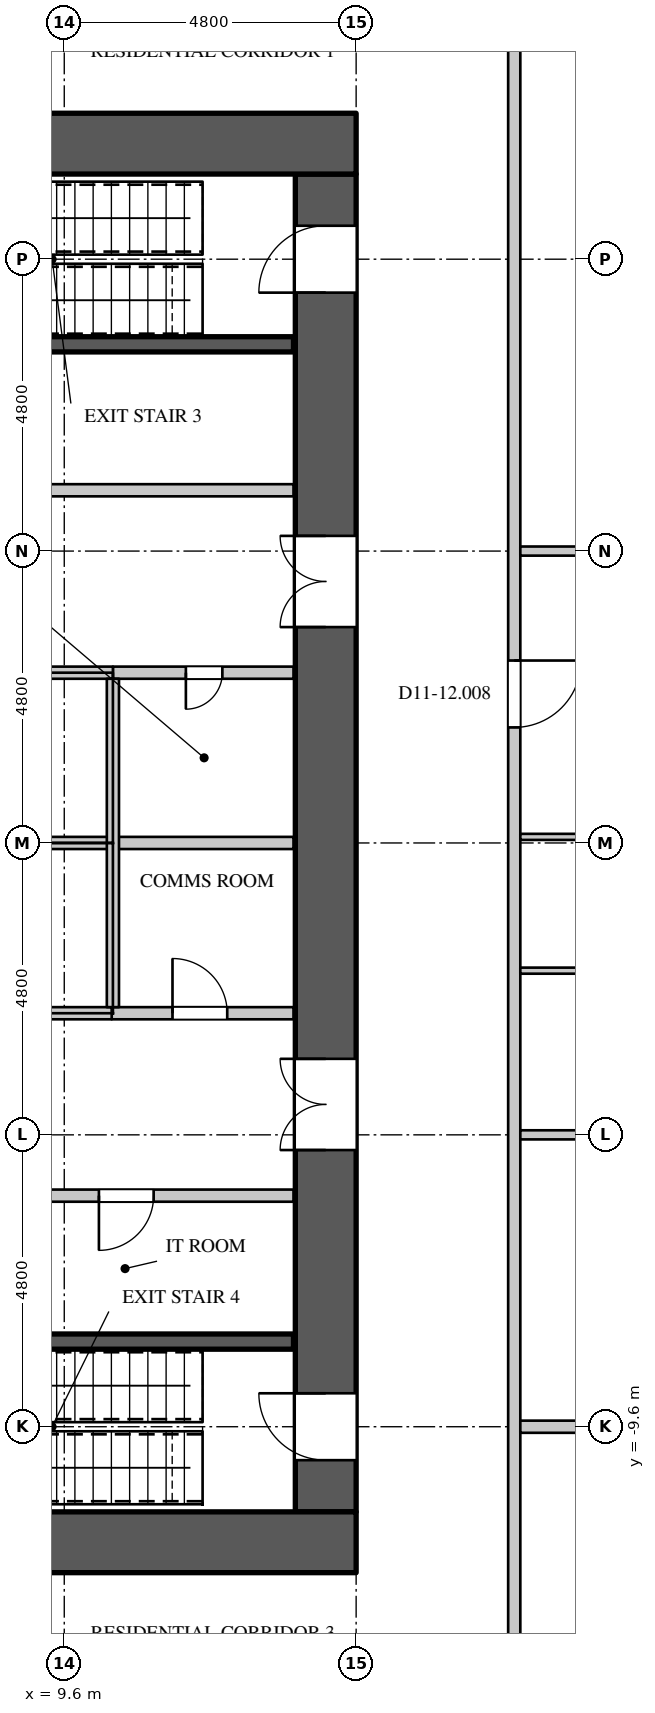
"""IFC4 building model, lengths in metres.
Left out: names, types, materials, properties, quantities, classifications, styles, units other than length and angle.
Written with IfcOpenShell. Run it as: python <this file> out.ifc"""

import sys

from ifc_helpers import new_model, si_unit, direction, frame, frame_2d, origin, place, context, subcontext, project, spatial, rectangle, extrude, element, fill, save


model = new_model("IFC4")
c1 = context("Model", 3, precision=1e-05, world=origin(), true_north=direction((0.0, 1.0)))
c2 = subcontext(c1, "Body", "Model", "MODEL_VIEW")
j1 = project(units=[si_unit("LENGTHUNIT", "METRE"), si_unit("PLANEANGLEUNIT", "RADIAN")], contexts=[c1])
p1 = place(None, origin())
s1 = spatial("IfcSite", under=j1, at=p1, CompositionType="ELEMENT")
p2 = place(p1, origin())
s2 = spatial("IfcBuilding", under=s1, at=p2, CompositionType="ELEMENT")
p3 = place(p2, frame((0.0, 0.0, 50.7)))
s3 = spatial("IfcBuildingStorey", under=s2, at=p3, CompositionType="ELEMENT", Elevation=50.7)
for number, where, z_axis, x_axis in (
    (1, (-14.4, 11.5, 0.0), (0.0, 0.0, 1.0), (1.0, 0.0, 0.0)),
    (2, (-14.4, -11.5, 0.0), (0.0, 0.0, 1.0), (1.0, 0.0, 0.0)),
):
    element("IfcWall", number, at=place(p3, frame(where, z_axis=z_axis, x_axis=x_axis)), inside=s3, PredefinedType="SHEAR", context=c2, shape_type="SweptSolid", body=[
        extrude(rectangle(XDim=28.8, YDim=1.0, at=frame_2d((14.4, 0.0))), origin(), (0.0, 0.0, 1.0), 4.2),
    ])
p4 = place(p3, frame((13.9, -11.0, 0.0), z_axis=(0.0, 0.0, 1.0), x_axis=(0.0, 1.0, 0.0)))
e3 = element("IfcWall", 3, at=p4, inside=s3, PredefinedType="SHEAR", context=c2, shape_type="SweptSolid", body=[
    extrude(rectangle(XDim=22.0, YDim=1.0, at=frame_2d((11.0, 0.0))), origin(), (0.0, 0.0, 1.0), 4.2),
])
p5 = place(p4, frame((20.05, 0.0, 0.0)))
e4 = element("IfcOpeningElement", 4, at=p5, cuts=e3, PredefinedType="OPENING", context=c2, shape_type="SweptSolid", body=[
    extrude(rectangle(XDim=1.1, YDim=2.2, at=frame_2d((0.55, 1.1))), frame((0.0, 0.51, 0.0), z_axis=(0.0, -1.0, 0.0), x_axis=(1.0, 0.0, 0.0)), (0.0, 0.0, 1.0), 1.02),
])
p6 = place(p4, frame((0.85, 0.0, 0.0)))
e5 = element("IfcOpeningElement", 5, at=p6, cuts=e3, PredefinedType="OPENING", context=c2, shape_type="SweptSolid", body=[
    extrude(rectangle(XDim=1.1, YDim=2.2, at=frame_2d((0.55, 1.1))), frame((0.0, 0.51, 0.0), z_axis=(0.0, -1.0, 0.0), x_axis=(1.0, 0.0, 0.0)), (0.0, 0.0, 1.0), 1.02),
])
p7 = place(p4, frame((14.55, 0.0, 0.0)))
e6 = element("IfcOpeningElement", 6, at=p7, cuts=e3, PredefinedType="OPENING", context=c2, shape_type="SweptSolid", body=[
    extrude(rectangle(XDim=1.5, YDim=2.4, at=frame_2d((0.75, 1.2))), frame((0.0, 0.51, 0.0), z_axis=(0.0, -1.0, 0.0), x_axis=(1.0, 0.0, 0.0)), (0.0, 0.0, 1.0), 1.02),
])
p8 = place(p4, frame((5.95, 0.0, 0.0)))
e7 = element("IfcOpeningElement", 7, at=p8, cuts=e3, PredefinedType="OPENING", context=c2, shape_type="SweptSolid", body=[
    extrude(rectangle(XDim=1.5, YDim=2.4, at=frame_2d((0.75, 1.2))), frame((0.0, 0.51, 0.0), z_axis=(0.0, -1.0, 0.0), x_axis=(1.0, 0.0, 0.0)), (0.0, 0.0, 1.0), 1.02),
])
p9 = place(p3, frame((17.0, -14.5, 0.0), z_axis=(0.0, 0.0, 1.0), x_axis=(0.0, 1.0, 0.0)))
e8 = element("IfcWall", 8, at=p9, inside=s3, PredefinedType="PARTITIONING", context=c2, shape_type="SweptSolid", body=[
    extrude(rectangle(XDim=29.0, YDim=0.2, at=frame_2d((14.5, 0.0))), origin(), (0.0, 0.0, 1.0), 3.95),
])
p10 = place(p9, frame((16.4, 0.0, 0.0)))
e9 = element("IfcOpeningElement", 9, at=p10, cuts=e8, PredefinedType="OPENING", context=c2, shape_type="SweptSolid", body=[
    extrude(rectangle(XDim=1.1, YDim=2.4, at=frame_2d((0.55, 1.2))), frame((0.0, 0.11, 0.0), z_axis=(0.0, -1.0, 0.0), x_axis=(1.0, 0.0, 0.0)), (0.0, 0.0, 1.0), 0.22),
])
p11 = place(p3, frame((17.1, -4.8, 0.0), z_axis=(0.0, 0.0, 1.0), x_axis=(1.0, 0.0, 0.0)))
e10 = element("IfcWall", 10, at=p11, inside=s3, PredefinedType="PARTITIONING", context=c2, shape_type="SweptSolid", body=[
    extrude(rectangle(XDim=10.8, YDim=0.15, at=frame_2d((5.4, 0.0))), origin(), (0.0, 0.0, 1.0), 3.25),
])
p12 = place(p11, frame((1.8, 0.0, 0.0)))
e11 = element("IfcOpeningElement", 11, at=p12, cuts=e10, PredefinedType="OPENING", context=c2, shape_type="SweptSolid", body=[
    extrude(rectangle(XDim=0.95, YDim=2.2, at=frame_2d((0.475, 1.1))), frame((0.0, 0.085, 0.0), z_axis=(0.0, -1.0, 0.0), x_axis=(1.0, 0.0, 0.0)), (0.0, 0.0, 1.0), 0.17),
])
p13 = place(p3, frame((17.1, 4.8, 0.0), z_axis=(0.0, 0.0, 1.0), x_axis=(1.0, 0.0, 0.0)))
e12 = element("IfcWall", 12, at=p13, inside=s3, PredefinedType="PARTITIONING", context=c2, shape_type="SweptSolid", body=[
    extrude(rectangle(XDim=10.8, YDim=0.15, at=frame_2d((5.4, 0.0))), origin(), (0.0, 0.0, 1.0), 3.25),
])
p14 = place(p13, frame((1.8, 0.0, 0.0)))
e13 = element("IfcOpeningElement", 13, at=p14, cuts=e12, PredefinedType="OPENING", context=c2, shape_type="SweptSolid", body=[
    extrude(rectangle(XDim=0.95, YDim=2.2, at=frame_2d((0.475, 1.1))), frame((0.0, 0.085, 0.0), z_axis=(0.0, -1.0, 0.0), x_axis=(1.0, 0.0, 0.0)), (0.0, 0.0, 1.0), 0.17),
])
p15 = place(p3, frame((17.552, -17.446, 0.0), z_axis=(0.0, 0.0, 1.0), x_axis=(0.707106781187, 0.707106781187, 0.0)))
e14 = element("IfcWall", 14, at=p15, inside=s3, PredefinedType="PARTITIONING", context=c2, shape_type="SweptSolid", body=[
    extrude(rectangle(XDim=7.78, YDim=0.15, at=frame_2d((3.89, 0.0))), origin(), (0.0, 0.0, 1.0), 3.95),
])
p16 = place(p15, frame((1.95, 0.0, 0.0)))
e15 = element("IfcOpeningElement", 15, at=p16, cuts=e14, PredefinedType="OPENING", context=c2, shape_type="SweptSolid", body=[
    extrude(rectangle(XDim=0.95, YDim=2.2, at=frame_2d((0.475, 1.1))), frame((0.0, 0.085, 0.0), z_axis=(0.0, -1.0, 0.0), x_axis=(1.0, 0.0, 0.0)), (0.0, 0.0, 1.0), 0.17),
])
p17 = place(p15, frame((6.65, 0.0, 0.0)))
e16 = element("IfcOpeningElement", 16, at=p17, cuts=e14, PredefinedType="OPENING", context=c2, shape_type="SweptSolid", body=[
    extrude(rectangle(XDim=0.95, YDim=2.2, at=frame_2d((0.475, 1.1))), frame((0.0, 0.085, 0.0), z_axis=(0.0, -1.0, 0.0), x_axis=(1.0, 0.0, 0.0)), (0.0, 0.0, 1.0), 0.17),
])
p18 = place(p3, frame((17.693, 17.587, 0.0), z_axis=(0.0, 0.0, 1.0), x_axis=(0.707106781187, -0.707106781187, 0.0)))
e17 = element("IfcWall", 17, at=p18, inside=s3, PredefinedType="PARTITIONING", context=c2, shape_type="SweptSolid", body=[
    extrude(rectangle(XDim=7.863, YDim=0.15, at=frame_2d((3.931, 0.0))), origin(), (0.0, 0.0, 1.0), 3.95),
])
p19 = place(p18, frame((2.05, 0.0, 0.0)))
e18 = element("IfcOpeningElement", 18, at=p19, cuts=e17, PredefinedType="OPENING", context=c2, shape_type="SweptSolid", body=[
    extrude(rectangle(XDim=0.95, YDim=2.2, at=frame_2d((0.475, 1.1))), frame((0.0, 0.085, 0.0), z_axis=(0.0, -1.0, 0.0), x_axis=(1.0, 0.0, 0.0)), (0.0, 0.0, 1.0), 0.17),
])
p20 = place(p18, frame((6.7, 0.0, 0.0)))
e19 = element("IfcOpeningElement", 19, at=p20, cuts=e17, PredefinedType="OPENING", context=c2, shape_type="SweptSolid", body=[
    extrude(rectangle(XDim=0.95, YDim=2.2, at=frame_2d((0.475, 1.1))), frame((0.0, 0.085, 0.0), z_axis=(0.0, -1.0, 0.0), x_axis=(1.0, 0.0, 0.0)), (0.0, 0.0, 1.0), 0.17),
])
p21 = place(p3, frame((17.1, -9.6, 0.0), z_axis=(0.0, 0.0, 1.0), x_axis=(1.0, 0.0, 0.0)))
e20 = element("IfcWall", 20, at=p21, inside=s3, PredefinedType="PARTITIONING", context=c2, shape_type="SweptSolid", body=[
    extrude(rectangle(XDim=11.755, YDim=0.2, at=frame_2d((5.877, 0.0))), origin(), (0.0, 0.0, 1.0), 3.95),
])
p22 = place(p3, frame((3.62, 5.8, 0.0), z_axis=(0.0, 0.0, 1.0), x_axis=(1.0, 0.0, 0.0)))
e21 = element("IfcWall", 21, at=p22, inside=s3, PredefinedType="PARTITIONING", context=c2, shape_type="SweptSolid", body=[
    extrude(rectangle(XDim=9.75, YDim=0.2, at=frame_2d((4.875, 0.0))), origin(), (0.0, 0.0, 1.0), 3.95),
])
p23 = place(p22, frame((4.45, 0.0, 0.0)))
e22 = element("IfcOpeningElement", 22, at=p23, cuts=e21, PredefinedType="OPENING", context=c2, shape_type="SweptSolid", body=[
    extrude(rectangle(XDim=0.9, YDim=2.2, at=frame_2d((0.45, 1.1))), frame((0.0, 0.11, 0.0), z_axis=(0.0, -1.0, 0.0), x_axis=(1.0, 0.0, 0.0)), (0.0, 0.0, 1.0), 0.22),
])
p24 = place(p3, frame((7.82, -5.8, 0.0), z_axis=(0.0, 0.0, 1.0), x_axis=(1.0, 0.0, 0.0)))
e23 = element("IfcWall", 23, at=p24, inside=s3, PredefinedType="PARTITIONING", context=c2, shape_type="SweptSolid", body=[
    extrude(rectangle(XDim=5.55, YDim=0.2, at=frame_2d((2.775, 0.0))), origin(), (0.0, 0.0, 1.0), 3.95),
])
p25 = place(p24, frame((2.35, 0.0, 0.0)))
e24 = element("IfcOpeningElement", 24, at=p25, cuts=e23, PredefinedType="OPENING", context=c2, shape_type="SweptSolid", body=[
    extrude(rectangle(XDim=0.9, YDim=2.2, at=frame_2d((0.45, 1.1))), frame((0.0, 0.11, 0.0), z_axis=(0.0, -1.0, 0.0), x_axis=(1.0, 0.0, 0.0)), (0.0, 0.0, 1.0), 0.22),
])
p26 = place(p3, frame((10.38, -2.8, 0.0), z_axis=(0.0, 0.0, 1.0), x_axis=(1.0, 0.0, 0.0)))
e25 = element("IfcWall", 25, at=p26, inside=s3, PredefinedType="PARTITIONING", context=c2, shape_type="SweptSolid", body=[
    extrude(rectangle(XDim=2.99, YDim=0.2, at=frame_2d((1.495, 0.0))), origin(), (0.0, 0.0, 1.0), 3.95),
])
p27 = place(p26, frame((1.0, 0.0, 0.0)))
e26 = element("IfcOpeningElement", 26, at=p27, cuts=e25, PredefinedType="OPENING", context=c2, shape_type="SweptSolid", body=[
    extrude(rectangle(XDim=0.9, YDim=2.2, at=frame_2d((0.45, 1.1))), frame((0.0, 0.11, 0.0), z_axis=(0.0, -1.0, 0.0), x_axis=(1.0, 0.0, 0.0)), (0.0, 0.0, 1.0), 0.22),
])
p28 = place(p3, frame((10.4, 2.8, 0.0), z_axis=(0.0, 0.0, 1.0), x_axis=(1.0, 0.0, 0.0)))
e27 = element("IfcWall", 27, at=p28, inside=s3, PredefinedType="PARTITIONING", context=c2, shape_type="SweptSolid", body=[
    extrude(rectangle(XDim=2.97, YDim=0.2, at=frame_2d((1.485, 0.0))), origin(), (0.0, 0.0, 1.0), 3.95),
])
p29 = place(p28, frame((1.2, 0.0, 0.0)))
e28 = element("IfcOpeningElement", 28, at=p29, cuts=e27, PredefinedType="OPENING", context=c2, shape_type="SweptSolid", body=[
    extrude(rectangle(XDim=0.6, YDim=2.0, at=frame_2d((0.3, 1.0))), frame((0.0, 0.11, 0.0), z_axis=(0.0, -1.0, 0.0), x_axis=(1.0, 0.0, 0.0)), (0.0, 0.0, 1.0), 0.22),
])
p30 = place(p3, frame((10.4, 0.0, 0.0), z_axis=(0.0, 0.0, 1.0), x_axis=(1.0, 0.0, 0.0)))
e29 = element("IfcWall", 29, at=p30, inside=s3, PredefinedType="PARTITIONING", context=c2, shape_type="SweptSolid", body=[
    extrude(rectangle(XDim=2.97, YDim=0.2, at=frame_2d((1.485, 0.0))), origin(), (0.0, 0.0, 1.0), 3.95),
])
p31 = place(p3, frame((-13.37, 0.0, 0.0), z_axis=(0.0, 0.0, 1.0), x_axis=(1.0, 0.0, 0.0)))
e30 = element("IfcWall", 30, at=p31, inside=s3, PredefinedType="PARTITIONING", context=c2, shape_type="SweptSolid", body=[
    extrude(rectangle(XDim=23.77, YDim=0.2, at=frame_2d((11.885, 0.0))), origin(), (0.0, 0.0, 1.0), 3.95),
])
p32 = place(p3, frame((-13.37, 2.8, 0.0), z_axis=(0.0, 0.0, 1.0), x_axis=(1.0, 0.0, 0.0)))
e31 = element("IfcWall", 31, at=p32, inside=s3, PredefinedType="PARTITIONING", context=c2, shape_type="SweptSolid", body=[
    extrude(rectangle(XDim=23.77, YDim=0.2, at=frame_2d((11.885, 0.0))), origin(), (0.0, 0.0, 1.0), 3.95),
])
p33 = place(p32, frame((0.9, 0.0, 0.0)))
e32 = element("IfcOpeningElement", 32, at=p33, cuts=e31, PredefinedType="OPENING", context=c2, shape_type="SweptSolid", body=[
    extrude(rectangle(XDim=1.1, YDim=2.2, at=frame_2d((0.55, 1.1))), frame((0.0, 0.11, 0.0), z_axis=(0.0, -1.0, 0.0), x_axis=(1.0, 0.0, 0.0)), (0.0, 0.0, 1.0), 0.22),
])
p34 = place(p32, frame((3.7, 0.0, 0.0)))
e33 = element("IfcOpeningElement", 33, at=p34, cuts=e31, PredefinedType="OPENING", context=c2, shape_type="SweptSolid", body=[
    extrude(rectangle(XDim=1.1, YDim=2.2, at=frame_2d((0.55, 1.1))), frame((0.0, 0.11, 0.0), z_axis=(0.0, -1.0, 0.0), x_axis=(1.0, 0.0, 0.0)), (0.0, 0.0, 1.0), 0.22),
])
p35 = place(p32, frame((6.3, 0.0, 0.0)))
e34 = element("IfcOpeningElement", 34, at=p35, cuts=e31, PredefinedType="OPENING", context=c2, shape_type="SweptSolid", body=[
    extrude(rectangle(XDim=1.1, YDim=2.2, at=frame_2d((0.55, 1.1))), frame((0.0, 0.11, 0.0), z_axis=(0.0, -1.0, 0.0), x_axis=(1.0, 0.0, 0.0)), (0.0, 0.0, 1.0), 0.22),
])
p36 = place(p32, frame((8.9, 0.0, 0.0)))
e35 = element("IfcOpeningElement", 35, at=p36, cuts=e31, PredefinedType="OPENING", context=c2, shape_type="SweptSolid", body=[
    extrude(rectangle(XDim=1.1, YDim=2.2, at=frame_2d((0.55, 1.1))), frame((0.0, 0.11, 0.0), z_axis=(0.0, -1.0, 0.0), x_axis=(1.0, 0.0, 0.0)), (0.0, 0.0, 1.0), 0.22),
])
p37 = place(p32, frame((11.5, 0.0, 0.0)))
e36 = element("IfcOpeningElement", 36, at=p37, cuts=e31, PredefinedType="OPENING", context=c2, shape_type="SweptSolid", body=[
    extrude(rectangle(XDim=1.1, YDim=2.2, at=frame_2d((0.55, 1.1))), frame((0.0, 0.11, 0.0), z_axis=(0.0, -1.0, 0.0), x_axis=(1.0, 0.0, 0.0)), (0.0, 0.0, 1.0), 0.22),
])
p38 = place(p32, frame((14.1, 0.0, 0.0)))
e37 = element("IfcOpeningElement", 37, at=p38, cuts=e31, PredefinedType="OPENING", context=c2, shape_type="SweptSolid", body=[
    extrude(rectangle(XDim=1.1, YDim=2.2, at=frame_2d((0.55, 1.1))), frame((0.0, 0.11, 0.0), z_axis=(0.0, -1.0, 0.0), x_axis=(1.0, 0.0, 0.0)), (0.0, 0.0, 1.0), 0.22),
])
p39 = place(p32, frame((16.7, 0.0, 0.0)))
e38 = element("IfcOpeningElement", 38, at=p39, cuts=e31, PredefinedType="OPENING", context=c2, shape_type="SweptSolid", body=[
    extrude(rectangle(XDim=1.1, YDim=2.2, at=frame_2d((0.55, 1.1))), frame((0.0, 0.11, 0.0), z_axis=(0.0, -1.0, 0.0), x_axis=(1.0, 0.0, 0.0)), (0.0, 0.0, 1.0), 0.22),
])
p40 = place(p32, frame((19.3, 0.0, 0.0)))
e39 = element("IfcOpeningElement", 39, at=p40, cuts=e31, PredefinedType="OPENING", context=c2, shape_type="SweptSolid", body=[
    extrude(rectangle(XDim=1.1, YDim=2.2, at=frame_2d((0.55, 1.1))), frame((0.0, 0.11, 0.0), z_axis=(0.0, -1.0, 0.0), x_axis=(1.0, 0.0, 0.0)), (0.0, 0.0, 1.0), 0.22),
])
p41 = place(p3, frame((7.82, -2.8, 0.0), z_axis=(0.0, 0.0, 1.0), x_axis=(1.0, 0.0, 0.0)))
e40 = element("IfcWall", 40, at=p41, inside=s3, PredefinedType="PARTITIONING", context=c2, shape_type="SweptSolid", body=[
    extrude(rectangle(XDim=2.56, YDim=0.2, at=frame_2d((1.28, 0.0))), origin(), (0.0, 0.0, 1.0), 3.95),
])
p42 = place(p3, frame((10.4, -2.7, 0.0), z_axis=(0.0, 0.0, 1.0), x_axis=(0.0, 1.0, 0.0)))
e41 = element("IfcWall", 41, at=p42, inside=s3, PredefinedType="PARTITIONING", context=c2, shape_type="SweptSolid", body=[
    extrude(rectangle(XDim=5.4, YDim=0.2, at=frame_2d((2.7, 0.0))), origin(), (0.0, 0.0, 1.0), 3.95),
])
for number, where, z_axis, x_axis in (
    (42, (5.275, -8.2, 0.0), (0.0, 0.0, 1.0), (1.0, 0.0, 0.0)),
    (43, (5.275, 8.2, 0.0), (0.0, 0.0, 1.0), (1.0, 0.0, 0.0)),
):
    element("IfcWall", number, at=place(p3, frame(where, z_axis=z_axis, x_axis=x_axis)), inside=s3, PredefinedType="SHEAR", context=c2, shape_type="SweptSolid", body=[
        extrude(rectangle(XDim=8.095, YDim=0.25, at=frame_2d((4.048, 0.0))), origin(), (0.0, 0.0, 1.0), 3.95),
    ])
p43 = place(p3, frame((17.1, -2.1, 0.0), z_axis=(0.0, 0.0, 1.0), x_axis=(1.0, 0.0, 0.0)))
e44 = element("IfcWall", 44, at=p43, inside=s3, PredefinedType="PARTITIONING", context=c2, shape_type="SweptSolid", body=[
    extrude(rectangle(XDim=4.625, YDim=0.1, at=frame_2d((2.312, 0.0))), origin(), (0.0, 0.0, 1.0), 3.95),
])
p44 = place(p3, frame((17.1, 0.1, 0.0), z_axis=(0.0, 0.0, 1.0), x_axis=(1.0, 0.0, 0.0)))
e45 = element("IfcWall", 45, at=p44, inside=s3, PredefinedType="PARTITIONING", context=c2, shape_type="SweptSolid", body=[
    extrude(rectangle(XDim=4.65, YDim=0.1, at=frame_2d((2.325, 0.0))), origin(), (0.0, 0.0, 1.0), 3.95),
])
p45 = place(p44, frame((1.85, 0.0, 0.0)))
e46 = element("IfcOpeningElement", 46, at=p45, cuts=e45, PredefinedType="OPENING", context=c2, shape_type="SweptSolid", body=[
    extrude(rectangle(XDim=0.9, YDim=2.2, at=frame_2d((0.45, 1.1))), frame((0.0, 0.06, 0.0), z_axis=(0.0, -1.0, 0.0), x_axis=(1.0, 0.0, 0.0)), (0.0, 0.0, 1.0), 0.12),
])
p46 = place(p29, origin())
e47 = element("IfcDoor", 47, at=p46, inside=s3, OperationType="SINGLE_SWING_RIGHT", PredefinedType="DOOR", context=c2, shape_type="SweptSolid", body=[
    extrude(rectangle(XDim=0.6, YDim=2.0, at=frame_2d((0.3, 1.0))), frame((0.0, 0.025, 0.0), z_axis=(0.0, -1.0, 0.0), x_axis=(1.0, 0.0, 0.0)), (0.0, 0.0, 1.0), 0.05),
])
fill(e28, e47)
p47 = place(p27, origin())
e48 = element("IfcDoor", 48, at=p47, inside=s3, OperationType="SINGLE_SWING_LEFT", PredefinedType="DOOR", context=c2, shape_type="SweptSolid", body=[
    extrude(rectangle(XDim=0.9, YDim=2.2, at=frame_2d((0.45, 1.1))), frame((0.0, 0.025, 0.0), z_axis=(0.0, -1.0, 0.0), x_axis=(1.0, 0.0, 0.0)), (0.0, 0.0, 1.0), 0.05),
])
fill(e26, e48)
p48 = place(p25, origin())
e49 = element("IfcDoor", 49, at=p48, inside=s3, OperationType="SINGLE_SWING_RIGHT", PredefinedType="DOOR", context=c2, shape_type="SweptSolid", body=[
    extrude(rectangle(XDim=0.9, YDim=2.2, at=frame_2d((0.45, 1.1))), frame((0.0, 0.025, 0.0), z_axis=(0.0, -1.0, 0.0), x_axis=(1.0, 0.0, 0.0)), (0.0, 0.0, 1.0), 0.05),
])
fill(e24, e49)
p49 = place(p5, origin())
e50 = element("IfcDoor", 50, at=p49, inside=s3, OperationType="SINGLE_SWING_LEFT", PredefinedType="DOOR", context=c2, shape_type="SweptSolid", body=[
    extrude(rectangle(XDim=1.1, YDim=2.2, at=frame_2d((0.55, 1.1))), frame((0.0, 0.495, 0.0), z_axis=(0.0, -1.0, 0.0), x_axis=(1.0, 0.0, 0.0)), (0.0, 0.0, 1.0), 0.05),
])
fill(e4, e50)
p50 = place(p6, origin())
e51 = element("IfcDoor", 51, at=p50, inside=s3, OperationType="SINGLE_SWING_RIGHT", PredefinedType="DOOR", context=c2, shape_type="SweptSolid", body=[
    extrude(rectangle(XDim=1.1, YDim=2.2, at=frame_2d((0.55, 1.1))), frame((0.0, 0.495, 0.0), z_axis=(0.0, -1.0, 0.0), x_axis=(1.0, 0.0, 0.0)), (0.0, 0.0, 1.0), 0.05),
])
fill(e5, e51)
p51 = place(p7, origin())
e52 = element("IfcDoor", 52, at=p51, inside=s3, OperationType="DOUBLE_DOOR_SINGLE_SWING", PredefinedType="DOOR", context=c2, shape_type="SweptSolid", body=[
    extrude(rectangle(XDim=1.5, YDim=2.4, at=frame_2d((0.75, 1.2))), frame((0.0, 0.495, 0.0), z_axis=(0.0, -1.0, 0.0), x_axis=(1.0, 0.0, 0.0)), (0.0, 0.0, 1.0), 0.05),
])
fill(e6, e52)
p52 = place(p8, origin())
e53 = element("IfcDoor", 53, at=p52, inside=s3, OperationType="DOUBLE_DOOR_SINGLE_SWING", PredefinedType="DOOR", context=c2, shape_type="SweptSolid", body=[
    extrude(rectangle(XDim=1.5, YDim=2.4, at=frame_2d((0.75, 1.2))), frame((0.0, 0.495, 0.0), z_axis=(0.0, -1.0, 0.0), x_axis=(1.0, 0.0, 0.0)), (0.0, 0.0, 1.0), 0.05),
])
fill(e7, e53)
p53 = place(p10, origin())
e54 = element("IfcDoor", 54, at=p53, inside=s3, OperationType="SINGLE_SWING_LEFT", PredefinedType="DOOR", context=c2, shape_type="SweptSolid", body=[
    extrude(rectangle(XDim=1.1, YDim=2.4, at=frame_2d((0.55, 1.2))), frame((0.0, 0.025, 0.0), z_axis=(0.0, -1.0, 0.0), x_axis=(1.0, 0.0, 0.0)), (0.0, 0.0, 1.0), 0.05),
])
fill(e9, e54)
save(model, sys.argv[1])
